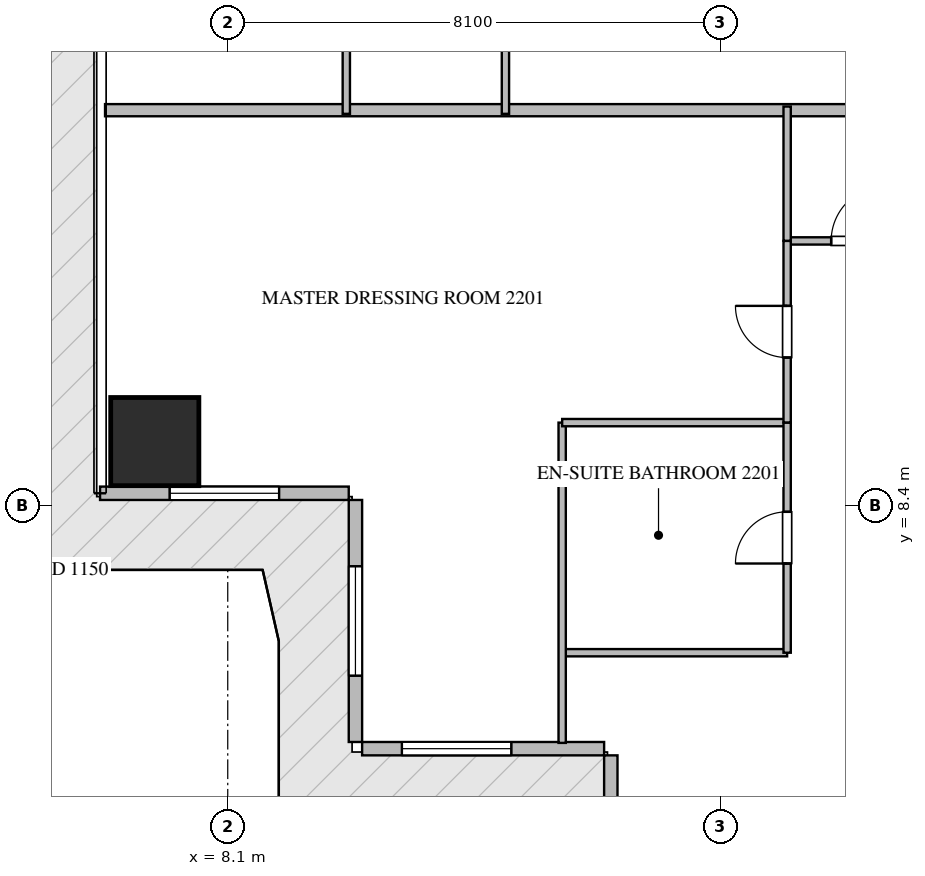
"""IFC4 building model, lengths in metres.
Left out: names, types, materials, properties, quantities, classifications, styles, units other than length and angle.
Written with IfcOpenShell. Run it as: python <this file> out.ifc"""

import sys

from ifc_helpers import new_model, si_unit, direction, frame, frame_2d, origin, origin_2d, place, context, subcontext, project, spatial, rectangle, extrude, source, transform, mapped, element, fill, save


model = new_model("IFC4")
c1 = context("Model", 3, precision=1e-05, world=origin(), true_north=direction((0.0, 1.0)))
c2 = subcontext(c1, "Body", "Model", "MODEL_VIEW")
j1 = project(units=[si_unit("LENGTHUNIT", "METRE"), si_unit("PLANEANGLEUNIT", "RADIAN")], contexts=[c1])
p1 = place(None, origin())
s1 = spatial("IfcSite", under=j1, at=p1, CompositionType="ELEMENT")
p2 = place(p1, origin())
s2 = spatial("IfcBuilding", under=s1, at=p2, CompositionType="ELEMENT")
p3 = place(p2, frame((0.0, 0.0, 90.45)))
s3 = spatial("IfcBuildingStorey", under=s2, at=p3, CompositionType="ELEMENT", Elevation=90.45)
m1 = source(origin(), c2, "Body", "SweptSolid", [
    extrude(rectangle(XDim=1.45, YDim=1.45, at=origin_2d()), origin(), (0.0, 0.0, 1.0), 3.75),
])
p4 = place(p3, frame((6.9, 9.45, -0.26), z_axis=(0.0, 0.0, 1.0), x_axis=(1.0, 0.0, 0.0)))
e1 = element("IfcColumn", 1, at=p4, inside=s3, PredefinedType="COLUMN", context=c2, shape_type="MappedRepresentation", body=[
    mapped(m1, transform((0.0, 0.0, 0.0), scale=1.0)),
])
p5 = place(p3, frame((6.0, 8.6, 0.0), z_axis=(0.0, 0.0, 1.0), x_axis=(1.0, 0.0, 0.0)))
e2 = element("IfcWall", 2, at=p5, inside=s3, PredefinedType="ELEMENTEDWALL", context=c2, shape_type="SweptSolid", body=[
    extrude(rectangle(XDim=4.09, YDim=0.22, at=frame_2d((2.045, 0.0))), origin(), (0.0, 0.0, 1.0), 3.475),
])
p6 = place(p5, frame((1.145, 0.0, 0.65)))
e3 = element("IfcOpeningElement", 3, at=p6, cuts=e2, PredefinedType="OPENING", context=c2, shape_type="SweptSolid", body=[
    extrude(rectangle(XDim=1.8, YDim=2.1, at=frame_2d((0.9, 1.05))), frame((0.0, 0.12, 0.0), z_axis=(0.0, -1.0, 0.0), x_axis=(1.0, 0.0, 0.0)), (0.0, 0.0, 1.0), 0.24),
])
p7 = place(p3, frame((10.2, 8.49, 0.0), z_axis=(0.0, 0.0, 1.0), x_axis=(0.0, -1.0, 0.0)))
e4 = element("IfcWall", 4, at=p7, inside=s3, PredefinedType="ELEMENTEDWALL", context=c2, shape_type="SweptSolid", body=[
    extrude(rectangle(XDim=3.98, YDim=0.22, at=frame_2d((1.99, 0.0))), origin(), (0.0, 0.0, 1.0), 3.475),
])
p8 = place(p7, frame((1.09, 0.0, 0.65)))
e5 = element("IfcOpeningElement", 5, at=p8, cuts=e4, PredefinedType="OPENING", context=c2, shape_type="SweptSolid", body=[
    extrude(rectangle(XDim=1.8, YDim=2.1, at=frame_2d((0.9, 1.05))), frame((0.0, 0.12, 0.0), z_axis=(0.0, -1.0, 0.0), x_axis=(1.0, 0.0, 0.0)), (0.0, 0.0, 1.0), 0.24),
])
p9 = place(p3, frame((10.31, 4.4, 0.0), z_axis=(0.0, 0.0, 1.0), x_axis=(1.0, 0.0, 0.0)))
e6 = element("IfcWall", 6, at=p9, inside=s3, PredefinedType="ELEMENTEDWALL", context=c2, shape_type="SweptSolid", body=[
    extrude(rectangle(XDim=3.98, YDim=0.22, at=frame_2d((1.99, 0.0))), origin(), (0.0, 0.0, 1.0), 3.475),
])
p10 = place(p9, frame((0.654, 0.0, 0.65)))
e7 = element("IfcOpeningElement", 7, at=p10, cuts=e6, PredefinedType="OPENING", context=c2, shape_type="SweptSolid", body=[
    extrude(rectangle(XDim=1.8, YDim=2.1, at=frame_2d((0.9, 1.05))), frame((0.0, 0.12, 0.0), z_axis=(0.0, -1.0, 0.0), x_axis=(1.0, 0.0, 0.0)), (0.0, 0.0, 1.0), 0.24),
])
p11 = place(p3, frame((14.4, 4.29, 0.0), z_axis=(0.0, 0.0, 1.0), x_axis=(0.0, -1.0, 0.0)))
e8 = element("IfcWall", 8, at=p11, inside=s3, PredefinedType="ELEMENTEDWALL", context=c2, shape_type="SweptSolid", body=[
    extrude(rectangle(XDim=4.09, YDim=0.22, at=frame_2d((2.045, 0.0))), origin(), (0.0, 0.0, 1.0), 3.475),
])
p12 = place(p11, frame((1.145, 0.0, 0.65)))
e9 = element("IfcOpeningElement", 9, at=p12, cuts=e8, PredefinedType="OPENING", context=c2, shape_type="SweptSolid", body=[
    extrude(rectangle(XDim=1.8, YDim=2.1, at=frame_2d((0.9, 1.05))), frame((0.0, 0.12, 0.0), z_axis=(0.0, -1.0, 0.0), x_axis=(1.0, 0.0, 0.0)), (0.0, 0.0, 1.0), 0.24),
])
p13 = place(p3, frame((6.082, 14.9, 0.0), z_axis=(0.0, 0.0, 1.0), x_axis=(1.0, 0.0, 0.0)))
e10 = element("IfcWall", 10, at=p13, inside=s3, PredefinedType="PARTITIONING", context=c2, shape_type="SweptSolid", body=[
    extrude(rectangle(XDim=15.318, YDim=0.2, at=frame_2d((7.659, 0.0))), origin(), (0.0, 0.0, 1.0), 3.49),
])
p14 = place(p3, frame((17.3, 12.75, 0.0), z_axis=(0.0, 0.0, 1.0), x_axis=(1.0, 0.0, 0.0)))
e11 = element("IfcWall", 11, at=p14, inside=s3, PredefinedType="PARTITIONING", context=c2, shape_type="SweptSolid", body=[
    extrude(rectangle(XDim=2.348, YDim=0.12, at=frame_2d((1.174, 0.0))), origin(), (0.0, 0.0, 1.0), 3.49),
])
p15 = place(p14, frame((0.724, 0.0, 0.0)))
e12 = element("IfcOpeningElement", 12, at=p15, cuts=e11, PredefinedType="OPENING", context=c2, shape_type="SweptSolid", body=[
    extrude(rectangle(XDim=0.9, YDim=2.1, at=frame_2d((0.45, 1.05))), frame((0.0, 0.07, 0.0), z_axis=(0.0, -1.0, 0.0), x_axis=(1.0, 0.0, 0.0)), (0.0, 0.0, 1.0), 0.14),
])
p16 = place(p3, frame((13.6, 5.978, 0.0), z_axis=(0.0, 0.0, 1.0), x_axis=(1.0, 0.0, 0.0)))
e13 = element("IfcWall", 13, at=p16, inside=s3, PredefinedType="PARTITIONING", context=c2, shape_type="SweptSolid", body=[
    extrude(rectangle(XDim=3.7, YDim=0.12, at=frame_2d((1.85, 0.0))), origin(), (0.0, 0.0, 1.0), 3.49),
])
p17 = place(p3, frame((13.6, 4.495, 0.0), z_axis=(0.0, 0.0, 1.0), x_axis=(0.0, 1.0, 0.0)))
e14 = element("IfcWall", 14, at=p17, inside=s3, PredefinedType="PARTITIONING", context=c2, shape_type="SweptSolid", body=[
    extrude(rectangle(XDim=5.267, YDim=0.12, at=frame_2d((2.633, 0.0))), origin(), (0.0, 0.0, 1.0), 3.49),
])
p18 = place(p3, frame((13.6, 9.762, 0.0), z_axis=(0.0, 0.0, 1.0), x_axis=(1.0, 0.0, 0.0)))
e15 = element("IfcWall", 15, at=p18, inside=s3, PredefinedType="PARTITIONING", context=c2, shape_type="SweptSolid", body=[
    extrude(rectangle(XDim=3.7, YDim=0.12, at=frame_2d((1.85, 0.0))), origin(), (0.0, 0.0, 1.0), 3.49),
])
p19 = place(p3, frame((17.3, 5.978, 0.0), z_axis=(0.0, 0.0, 1.0), x_axis=(0.0, 1.0, 0.0)))
e16 = element("IfcWall", 16, at=p19, inside=s3, PredefinedType="PARTITIONING", context=c2, shape_type="SweptSolid", body=[
    extrude(rectangle(XDim=3.784, YDim=0.12, at=frame_2d((1.892, 0.0))), origin(), (0.0, 0.0, 1.0), 3.49),
])
p20 = place(p19, frame((1.467, 0.0, 0.0)))
e17 = element("IfcOpeningElement", 17, at=p20, cuts=e16, PredefinedType="OPENING", context=c2, shape_type="SweptSolid", body=[
    extrude(rectangle(XDim=0.85, YDim=2.1, at=frame_2d((0.425, 1.05))), frame((0.0, 0.07, 0.0), z_axis=(0.0, -1.0, 0.0), x_axis=(1.0, 0.0, 0.0)), (0.0, 0.0, 1.0), 0.14),
])
p21 = place(p3, frame((17.3, 9.764, 0.0), z_axis=(0.0, 0.0, 1.0), x_axis=(0.0, 1.0, 0.0)))
e18 = element("IfcWall", 18, at=p21, inside=s3, PredefinedType="PARTITIONING", context=c2, shape_type="SweptSolid", body=[
    extrude(rectangle(XDim=2.986, YDim=0.12, at=frame_2d((1.493, 0.0))), origin(), (0.0, 0.0, 1.0), 3.49),
])
p22 = place(p21, frame((1.068, 0.0, 0.0)))
e19 = element("IfcOpeningElement", 19, at=p22, cuts=e18, PredefinedType="OPENING", context=c2, shape_type="SweptSolid", body=[
    extrude(rectangle(XDim=0.85, YDim=2.1, at=frame_2d((0.425, 1.05))), frame((0.0, 0.07, 0.0), z_axis=(0.0, -1.0, 0.0), x_axis=(1.0, 0.0, 0.0)), (0.0, 0.0, 1.0), 0.14),
])
p23 = place(p3, frame((17.3, 12.752, 0.0), z_axis=(0.0, 0.0, 1.0), x_axis=(0.0, 1.0, 0.0)))
e20 = element("IfcWall", 20, at=p23, inside=s3, PredefinedType="PARTITIONING", context=c2, shape_type="SweptSolid", body=[
    extrude(rectangle(XDim=2.208, YDim=0.12, at=frame_2d((1.104, 0.0))), origin(), (0.0, 0.0, 1.0), 3.49),
])
for number, where, z_axis, x_axis in (
    (21, (10.05, 14.84, 0.0), (0.0, 0.0, 1.0), (0.0, 1.0, 0.0)),
    (22, (12.667, 14.84, 0.0), (0.0, 0.0, 1.0), (0.0, 1.0, 0.0)),
):
    element("IfcWall", number, at=place(p3, frame(where, z_axis=z_axis, x_axis=x_axis)), inside=s3, PredefinedType="PARTITIONING", context=c2, shape_type="SweptSolid", body=[
        extrude(rectangle(XDim=5.41, YDim=0.12, at=frame_2d((2.705, 0.0))), origin(), (0.0, 0.0, 1.0), 3.49),
    ])
m2 = source(origin(), c2, "Body", "SweptSolid", [
    extrude(rectangle(XDim=1.8, YDim=2.1, at=frame_2d((0.9, 1.05))), frame((0.0, 0.03, 0.0), z_axis=(0.0, -1.0, 0.0), x_axis=(1.0, 0.0, 0.0)), (0.0, 0.0, 1.0), 0.06),
])
p24 = place(p6, origin())
e23 = element("IfcWindow", 23, at=p24, inside=s3, PartitioningType="SINGLE_PANEL", PredefinedType="WINDOW", context=c2, shape_type="MappedRepresentation", body=[
    mapped(m2, transform((0.0, 0.0, 0.0), scale=1.0)),
])
fill(e3, e23)
p25 = place(p8, origin())
e24 = element("IfcWindow", 24, at=p25, inside=s3, PartitioningType="SINGLE_PANEL", PredefinedType="WINDOW", context=c2, shape_type="MappedRepresentation", body=[
    mapped(m2, transform((0.0, 0.0, 0.0), scale=1.0)),
])
fill(e5, e24)
p26 = place(p10, origin())
e25 = element("IfcWindow", 25, at=p26, inside=s3, PartitioningType="SINGLE_PANEL", PredefinedType="WINDOW", context=c2, shape_type="MappedRepresentation", body=[
    mapped(m2, transform((0.0, 0.0, 0.0), scale=1.0)),
])
fill(e7, e25)
m3 = source(origin(), c2, "Body", "SweptSolid", [
    extrude(rectangle(XDim=0.9, YDim=2.1, at=frame_2d((0.45, 1.05))), frame((0.0, 0.025, 0.0), z_axis=(0.0, -1.0, 0.0), x_axis=(1.0, 0.0, 0.0)), (0.0, 0.0, 1.0), 0.05),
])
p27 = place(p15, origin())
e26 = element("IfcDoor", 26, at=p27, inside=s3, OperationType="SINGLE_SWING_RIGHT", PredefinedType="DOOR", context=c2, shape_type="MappedRepresentation", body=[
    mapped(m3, transform((0.0, 0.0, 0.0), scale=1.0)),
])
fill(e12, e26)
m4 = source(origin(), c2, "Body", "SweptSolid", [
    extrude(rectangle(XDim=0.85, YDim=2.1, at=frame_2d((0.425, 1.05))), frame((0.0, 0.025, 0.0), z_axis=(0.0, -1.0, 0.0), x_axis=(1.0, 0.0, 0.0)), (0.0, 0.0, 1.0), 0.05),
])
p28 = place(p20, origin())
e27 = element("IfcDoor", 27, at=p28, inside=s3, OperationType="SINGLE_SWING_LEFT", PredefinedType="DOOR", context=c2, shape_type="MappedRepresentation", body=[
    mapped(m4, transform((0.0, 0.0, 0.0), scale=1.0)),
])
fill(e17, e27)
p29 = place(p22, origin())
e28 = element("IfcDoor", 28, at=p29, inside=s3, OperationType="SINGLE_SWING_RIGHT", PredefinedType="DOOR", context=c2, shape_type="MappedRepresentation", body=[
    mapped(m4, transform((0.0, 0.0, 0.0), scale=1.0)),
])
fill(e19, e28)
save(model, sys.argv[1])
